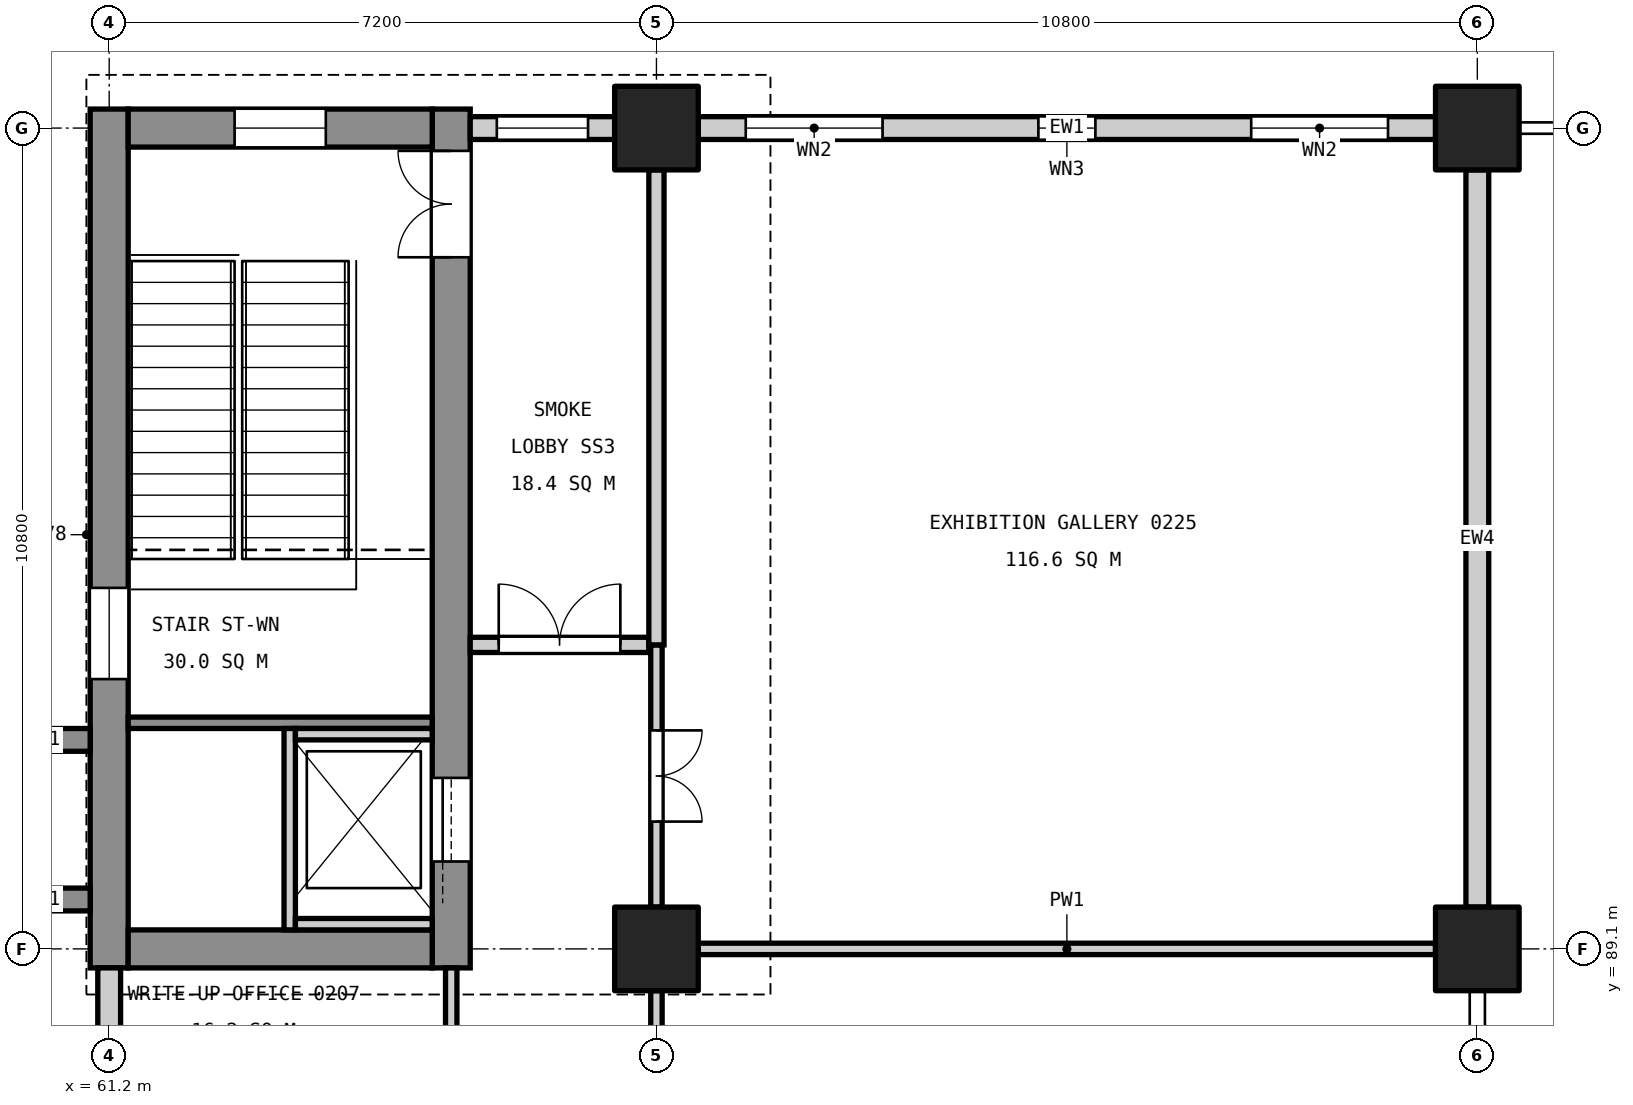
"""IFC4 building model, lengths in metres.
Left out: names, types, materials, properties, quantities, classifications, styles, units other than length and angle.
Written with IfcOpenShell. Run it as: python <this file> out.ifc"""

import sys

from ifc_helpers import new_model, si_unit, direction, frame, frame_2d, origin, origin_2d, place, context, subcontext, project, spatial, rectangle, extrude, element, fill, save


model = new_model("IFC4")
c1 = context("Model", 3, precision=1e-05, world=origin(), true_north=direction((0.0, 1.0)))
c2 = subcontext(c1, "Body", "Model", "MODEL_VIEW")
j1 = project(units=[si_unit("LENGTHUNIT", "METRE"), si_unit("PLANEANGLEUNIT", "RADIAN")], contexts=[c1])
p1 = place(None, origin())
s1 = spatial("IfcSite", under=j1, at=p1, CompositionType="ELEMENT")
p2 = place(p1, origin())
s2 = spatial("IfcBuilding", under=s1, at=p2, CompositionType="ELEMENT")
p3 = place(p2, frame((0.0, 0.0, 11.4)))
s3 = spatial("IfcBuildingStorey", under=s2, at=p3, CompositionType="ELEMENT", Elevation=11.4)
for number, where, z_axis, x_axis in (
    (1, (68.4, 89.1, 0.0), (0.0, 0.0, 1.0), (1.0, 0.0, 0.0)),
    (2, (68.4, 99.9, 0.0), (0.0, 0.0, 1.0), (1.0, 0.0, 0.0)),
    (3, (79.2, 89.1, 0.0), (0.0, 0.0, 1.0), (1.0, 0.0, 0.0)),
    (4, (79.2, 99.9, 0.0), (0.0, 0.0, 1.0), (1.0, 0.0, 0.0)),
):
    element("IfcColumn", number, at=place(p3, frame(where, z_axis=z_axis, x_axis=x_axis)), inside=s3, PredefinedType="COLUMN", context=c2, shape_type="SweptSolid", body=[
        extrude(rectangle(XDim=1.1, YDim=1.1, at=origin_2d()), origin(), (0.0, 0.0, 1.0), 5.4),
    ])
p4 = place(p3, frame((61.2, 88.85, 0.0), z_axis=(0.0, 0.0, 1.0), x_axis=(0.0, 1.0, 0.0)))
e5 = element("IfcWall", 5, at=p4, inside=s3, PredefinedType="SHEAR", context=c2, shape_type="SweptSolid", body=[
    extrude(rectangle(XDim=11.3, YDim=0.5, at=frame_2d((5.65, 0.0))), origin(), (0.0, 0.0, 1.0), 5.1),
])
p5 = place(p4, frame((3.8, 0.0, 3.4)))
e6 = element("IfcOpeningElement", 6, at=p5, cuts=e5, PredefinedType="OPENING", context=c2, shape_type="SweptSolid", body=[
    extrude(rectangle(XDim=1.2, YDim=0.9, at=frame_2d((0.6, 0.45))), frame((0.0, 0.26, 0.0), z_axis=(0.0, -1.0, 0.0), x_axis=(1.0, 0.0, 0.0)), (0.0, 0.0, 1.0), 0.52),
])
p6 = place(p3, frame((65.7, 88.85, 0.0), z_axis=(0.0, 0.0, 1.0), x_axis=(0.0, 1.0, 0.0)))
e7 = element("IfcWall", 7, at=p6, inside=s3, PredefinedType="SHEAR", context=c2, shape_type="SweptSolid", body=[
    extrude(rectangle(XDim=11.3, YDim=0.5, at=frame_2d((5.65, 0.0))), origin(), (0.0, 0.0, 1.0), 5.1),
])
p7 = place(p6, frame((9.35, 0.0, 0.0)))
e8 = element("IfcOpeningElement", 8, at=p7, cuts=e7, PredefinedType="OPENING", context=c2, shape_type="SweptSolid", body=[
    extrude(rectangle(XDim=1.4, YDim=2.1, at=frame_2d((0.7, 1.05))), frame((0.0, 0.26, 0.0), z_axis=(0.0, -1.0, 0.0), x_axis=(1.0, 0.0, 0.0)), (0.0, 0.0, 1.0), 0.52),
])
p8 = place(p6, frame((1.4, 0.0, 0.0)))
e9 = element("IfcOpeningElement", 9, at=p8, cuts=e7, PredefinedType="OPENING", context=c2, shape_type="SweptSolid", body=[
    extrude(rectangle(XDim=1.1, YDim=2.1, at=frame_2d((0.55, 1.05))), frame((0.0, 0.26, 0.0), z_axis=(0.0, -1.0, 0.0), x_axis=(1.0, 0.0, 0.0)), (0.0, 0.0, 1.0), 0.52),
])
p9 = place(p3, frame((61.45, 89.1, 0.0), z_axis=(0.0, 0.0, 1.0), x_axis=(1.0, 0.0, 0.0)))
e10 = element("IfcWall", 10, at=p9, inside=s3, PredefinedType="SHEAR", context=c2, shape_type="SweptSolid", body=[
    extrude(rectangle(XDim=4.0, YDim=0.5, at=frame_2d((2.0, 0.0))), origin(), (0.0, 0.0, 1.0), 5.1),
])
p10 = place(p3, frame((61.45, 99.9, 0.0), z_axis=(0.0, 0.0, 1.0), x_axis=(1.0, 0.0, 0.0)))
e11 = element("IfcWall", 11, at=p10, inside=s3, PredefinedType="SHEAR", context=c2, shape_type="SweptSolid", body=[
    extrude(rectangle(XDim=4.0, YDim=0.5, at=frame_2d((2.0, 0.0))), origin(), (0.0, 0.0, 1.0), 5.1),
])
p11 = place(p10, frame((1.4, 0.0, 3.4)))
e12 = element("IfcOpeningElement", 12, at=p11, cuts=e11, PredefinedType="OPENING", context=c2, shape_type="SweptSolid", body=[
    extrude(rectangle(XDim=1.2, YDim=0.9, at=frame_2d((0.6, 0.45))), frame((0.0, 0.26, 0.0), z_axis=(0.0, -1.0, 0.0), x_axis=(1.0, 0.0, 0.0)), (0.0, 0.0, 1.0), 0.52),
])
for number, where, z_axis, x_axis in (
    (13, (60.95, 89.75, 0.0), (0.0, 0.0, 1.0), (-1.0, 0.0, 0.0)),
    (14, (60.95, 91.85, 0.0), (0.0, 0.0, 1.0), (-1.0, 0.0, 0.0)),
):
    element("IfcWall", number, at=place(p3, frame(where, z_axis=z_axis, x_axis=x_axis)), inside=s3, PredefinedType="SHEAR", context=c2, shape_type="SweptSolid", body=[
        extrude(rectangle(XDim=1.25, YDim=0.3, at=frame_2d((0.625, 0.0))), origin(), (0.0, 0.0, 1.0), 5.4),
    ])
p12 = place(p3, frame((61.45, 92.075, 0.0), z_axis=(0.0, 0.0, 1.0), x_axis=(1.0, 0.0, 0.0)))
e15 = element("IfcWall", 15, at=p12, inside=s3, PredefinedType="SOLIDWALL", context=c2, shape_type="SweptSolid", body=[
    extrude(rectangle(XDim=4.0, YDim=0.15, at=frame_2d((2.0, 0.0))), origin(), (0.0, 0.0, 1.0), 5.1),
])
p13 = place(p3, frame((63.575, 92.0, 0.0), z_axis=(0.0, 0.0, 1.0), x_axis=(0.0, -1.0, 0.0)))
e16 = element("IfcWall", 16, at=p13, inside=s3, PredefinedType="SOLIDWALL", context=c2, shape_type="SweptSolid", body=[
    extrude(rectangle(XDim=2.65, YDim=0.15, at=frame_2d((1.325, 0.0))), origin(), (0.0, 0.0, 1.0), 5.4),
])
for number, where, z_axis, x_axis in (
    (17, (63.65, 91.925, 0.0), (0.0, 0.0, 1.0), (1.0, 0.0, 0.0)),
    (18, (63.65, 89.425, 0.0), (0.0, 0.0, 1.0), (1.0, 0.0, 0.0)),
):
    element("IfcWall", number, at=place(p3, frame(where, z_axis=z_axis, x_axis=x_axis)), inside=s3, PredefinedType="SOLIDWALL", context=c2, shape_type="SweptSolid", body=[
        extrude(rectangle(XDim=1.8, YDim=0.15, at=frame_2d((0.9, 0.0))), origin(), (0.0, 0.0, 1.0), 5.4),
    ])
p14 = place(p3, frame((61.2, 78.85, 0.0), z_axis=(0.0, 0.0, 1.0), x_axis=(0.0, 1.0, 0.0)))
e19 = element("IfcWall", 19, at=p14, inside=s3, PredefinedType="STANDARD", context=c2, shape_type="SweptSolid", body=[
    extrude(rectangle(XDim=10.0, YDim=0.3, at=frame_2d((5.0, 0.0))), origin(), (0.0, 0.0, 1.0), 4.1),
])
p15 = place(p14, frame((0.625, 0.0, 0.9)))
e20 = element("IfcOpeningElement", 20, at=p15, cuts=e19, PredefinedType="OPENING", context=c2, shape_type="SweptSolid", body=[
    extrude(rectangle(XDim=1.8, YDim=3.0, at=frame_2d((0.9, 1.5))), frame((0.0, 0.16, 0.0), z_axis=(0.0, -1.0, 0.0), x_axis=(1.0, 0.0, 0.0)), (0.0, 0.0, 1.0), 0.32),
])
p16 = place(p14, frame((3.95, 0.0, 0.9)))
e21 = element("IfcOpeningElement", 21, at=p16, cuts=e19, PredefinedType="OPENING", context=c2, shape_type="SweptSolid", body=[
    extrude(rectangle(XDim=1.8, YDim=3.0, at=frame_2d((0.9, 1.5))), frame((0.0, 0.16, 0.0), z_axis=(0.0, -1.0, 0.0), x_axis=(1.0, 0.0, 0.0)), (0.0, 0.0, 1.0), 0.32),
])
p17 = place(p14, frame((7.95, 0.0, 0.8)))
e22 = element("IfcOpeningElement", 22, at=p17, cuts=e19, PredefinedType="OPENING", context=c2, shape_type="SweptSolid", body=[
    extrude(rectangle(XDim=0.75, YDim=1.2, at=frame_2d((0.375, 0.6))), frame((0.0, 0.16, 0.0), z_axis=(0.0, -1.0, 0.0), x_axis=(1.0, 0.0, 0.0)), (0.0, 0.0, 1.0), 0.32),
])
p18 = place(p3, frame((65.95, 99.9, 0.0), z_axis=(0.0, 0.0, 1.0), x_axis=(1.0, 0.0, 0.0)))
e23 = element("IfcWall", 23, at=p18, inside=s3, PredefinedType="STANDARD", context=c2, shape_type="SweptSolid", body=[
    extrude(rectangle(XDim=1.9, YDim=0.3, at=frame_2d((0.95, 0.0))), origin(), (0.0, 0.0, 1.0), 4.3),
])
p19 = place(p18, frame((0.35, 0.0, 0.9)))
e24 = element("IfcOpeningElement", 24, at=p19, cuts=e23, PredefinedType="OPENING", context=c2, shape_type="SweptSolid", body=[
    extrude(rectangle(XDim=1.2, YDim=2.4, at=frame_2d((0.6, 1.2))), frame((0.0, 0.16, 0.0), z_axis=(0.0, -1.0, 0.0), x_axis=(1.0, 0.0, 0.0)), (0.0, 0.0, 1.0), 0.32),
])
p20 = place(p3, frame((68.95, 99.9, 0.0), z_axis=(0.0, 0.0, 1.0), x_axis=(1.0, 0.0, 0.0)))
e25 = element("IfcWall", 25, at=p20, inside=s3, PredefinedType="STANDARD", context=c2, shape_type="SweptSolid", body=[
    extrude(rectangle(XDim=9.7, YDim=0.3, at=frame_2d((4.85, 0.0))), origin(), (0.0, 0.0, 1.0), 4.3),
])
p21 = place(p20, frame((0.625, 0.0, 0.9)))
e26 = element("IfcOpeningElement", 26, at=p21, cuts=e25, PredefinedType="OPENING", context=c2, shape_type="SweptSolid", body=[
    extrude(rectangle(XDim=1.8, YDim=3.0, at=frame_2d((0.9, 1.5))), frame((0.0, 0.16, 0.0), z_axis=(0.0, -1.0, 0.0), x_axis=(1.0, 0.0, 0.0)), (0.0, 0.0, 1.0), 0.32),
])
p22 = place(p20, frame((4.475, 0.0, 0.8)))
e27 = element("IfcOpeningElement", 27, at=p22, cuts=e25, PredefinedType="OPENING", context=c2, shape_type="SweptSolid", body=[
    extrude(rectangle(XDim=0.75, YDim=1.2, at=frame_2d((0.375, 0.6))), frame((0.0, 0.16, 0.0), z_axis=(0.0, -1.0, 0.0), x_axis=(1.0, 0.0, 0.0)), (0.0, 0.0, 1.0), 0.32),
])
p23 = place(p20, frame((7.275, 0.0, 0.9)))
e28 = element("IfcOpeningElement", 28, at=p23, cuts=e25, PredefinedType="OPENING", context=c2, shape_type="SweptSolid", body=[
    extrude(rectangle(XDim=1.8, YDim=3.0, at=frame_2d((0.9, 1.5))), frame((0.0, 0.16, 0.0), z_axis=(0.0, -1.0, 0.0), x_axis=(1.0, 0.0, 0.0)), (0.0, 0.0, 1.0), 0.32),
])
p24 = place(p3, frame((79.2, 89.65, 0.0), z_axis=(0.0, 0.0, 1.0), x_axis=(0.0, 1.0, 0.0)))
e29 = element("IfcWall", 29, at=p24, inside=s3, PredefinedType="STANDARD", context=c2, shape_type="SweptSolid", body=[
    extrude(rectangle(XDim=9.7, YDim=0.3, at=frame_2d((4.85, 0.0))), origin(), (0.0, 0.0, 1.0), 4.0),
])
p25 = place(p3, frame((65.7, 78.45, 0.0), z_axis=(0.0, 0.0, 1.0), x_axis=(0.0, 1.0, 0.0)))
e30 = element("IfcWall", 30, at=p25, inside=s3, PredefinedType="PARTITIONING", context=c2, shape_type="SweptSolid", body=[
    extrude(rectangle(XDim=10.4, YDim=0.15, at=frame_2d((5.2, 0.0))), origin(), (0.0, 0.0, 1.0), 4.0),
])
p26 = place(p25, frame((2.95, 0.0, 0.0)))
e31 = element("IfcOpeningElement", 31, at=p26, cuts=e30, PredefinedType="OPENING", context=c2, shape_type="SweptSolid", body=[
    extrude(rectangle(XDim=1.0, YDim=2.1, at=frame_2d((0.5, 1.05))), frame((0.0, 0.085, 0.0), z_axis=(0.0, -1.0, 0.0), x_axis=(1.0, 0.0, 0.0)), (0.0, 0.0, 1.0), 0.17),
])
p27 = place(p25, frame((8.35, 0.0, 0.0)))
e32 = element("IfcOpeningElement", 32, at=p27, cuts=e30, PredefinedType="OPENING", context=c2, shape_type="SweptSolid", body=[
    extrude(rectangle(XDim=1.0, YDim=2.1, at=frame_2d((0.5, 1.05))), frame((0.0, 0.085, 0.0), z_axis=(0.0, -1.0, 0.0), x_axis=(1.0, 0.0, 0.0)), (0.0, 0.0, 1.0), 0.17),
])
p28 = place(p3, frame((65.95, 93.1, 0.0), z_axis=(0.0, 0.0, 1.0), x_axis=(1.0, 0.0, 0.0)))
e33 = element("IfcWall", 33, at=p28, inside=s3, PredefinedType="PARTITIONING", context=c2, shape_type="SweptSolid", body=[
    extrude(rectangle(XDim=2.35, YDim=0.2, at=frame_2d((1.175, 0.0))), origin(), (0.0, 0.0, 1.0), 4.0),
])
p29 = place(p28, frame((0.375, 0.0, 0.0)))
e34 = element("IfcOpeningElement", 34, at=p29, cuts=e33, PredefinedType="OPENING", context=c2, shape_type="SweptSolid", body=[
    extrude(rectangle(XDim=1.6, YDim=2.1, at=frame_2d((0.8, 1.05))), frame((0.0, 0.11, 0.0), z_axis=(0.0, -1.0, 0.0), x_axis=(1.0, 0.0, 0.0)), (0.0, 0.0, 1.0), 0.22),
])
p30 = place(p3, frame((68.4, 78.85, 0.0), z_axis=(0.0, 0.0, 1.0), x_axis=(0.0, 1.0, 0.0)))
e35 = element("IfcWall", 35, at=p30, inside=s3, PredefinedType="PARTITIONING", context=c2, shape_type="SweptSolid", body=[
    extrude(rectangle(XDim=9.7, YDim=0.15, at=frame_2d((4.85, 0.0))), origin(), (0.0, 0.0, 1.0), 4.0),
])
p31 = place(p30, frame((2.825, 0.0, 0.0)))
e36 = element("IfcOpeningElement", 36, at=p31, cuts=e35, PredefinedType="OPENING", context=c2, shape_type="SweptSolid", body=[
    extrude(rectangle(XDim=1.2, YDim=2.1, at=frame_2d((0.6, 1.05))), frame((0.0, 0.085, 0.0), z_axis=(0.0, -1.0, 0.0), x_axis=(1.0, 0.0, 0.0)), (0.0, 0.0, 1.0), 0.17),
])
p32 = place(p30, frame((7.575, 0.0, 0.0)))
e37 = element("IfcOpeningElement", 37, at=p32, cuts=e35, PredefinedType="OPENING", context=c2, shape_type="SweptSolid", body=[
    extrude(rectangle(XDim=1.2, YDim=2.1, at=frame_2d((0.6, 1.05))), frame((0.0, 0.085, 0.0), z_axis=(0.0, -1.0, 0.0), x_axis=(1.0, 0.0, 0.0)), (0.0, 0.0, 1.0), 0.17),
])
p33 = place(p3, frame((68.4, 89.65, 0.0), z_axis=(0.0, 0.0, 1.0), x_axis=(0.0, 1.0, 0.0)))
e38 = element("IfcWall", 38, at=p33, inside=s3, PredefinedType="PARTITIONING", context=c2, shape_type="SweptSolid", body=[
    extrude(rectangle(XDim=3.45, YDim=0.15, at=frame_2d((1.725, 0.0))), origin(), (0.0, 0.0, 1.0), 4.0),
])
p34 = place(p33, frame((1.125, 0.0, 0.0)))
e39 = element("IfcOpeningElement", 39, at=p34, cuts=e38, PredefinedType="OPENING", context=c2, shape_type="SweptSolid", body=[
    extrude(rectangle(XDim=1.2, YDim=2.1, at=frame_2d((0.6, 1.05))), frame((0.0, 0.085, 0.0), z_axis=(0.0, -1.0, 0.0), x_axis=(1.0, 0.0, 0.0)), (0.0, 0.0, 1.0), 0.17),
])
p35 = place(p3, frame((68.4, 93.1, 0.0), z_axis=(0.0, 0.0, 1.0), x_axis=(0.0, 1.0, 0.0)))
e40 = element("IfcWall", 40, at=p35, inside=s3, PredefinedType="PARTITIONING", context=c2, shape_type="SweptSolid", body=[
    extrude(rectangle(XDim=6.25, YDim=0.2, at=frame_2d((3.125, 0.0))), origin(), (0.0, 0.0, 1.0), 4.0),
])
p36 = place(p3, frame((68.95, 89.1, 0.0), z_axis=(0.0, 0.0, 1.0), x_axis=(1.0, 0.0, 0.0)))
e41 = element("IfcWall", 41, at=p36, inside=s3, PredefinedType="PARTITIONING", context=c2, shape_type="SweptSolid", body=[
    extrude(rectangle(XDim=9.7, YDim=0.15, at=frame_2d((4.85, 0.0))), origin(), (0.0, 0.0, 1.0), 4.3),
])
p37 = place(p7, origin())
e42 = element("IfcDoor", 42, at=p37, inside=s3, OperationType="DOUBLE_DOOR_SINGLE_SWING", PredefinedType="DOOR", context=c2, shape_type="SweptSolid", body=[
    extrude(rectangle(XDim=1.4, YDim=2.1, at=frame_2d((0.7, 1.05))), frame((0.0, 0.025, 0.0), z_axis=(0.0, -1.0, 0.0), x_axis=(1.0, 0.0, 0.0)), (0.0, 0.0, 1.0), 0.05),
])
fill(e8, e42)
p38 = place(p8, origin())
e43 = element("IfcDoor", 43, at=p38, inside=s3, OperationType="SLIDING_TO_LEFT", PredefinedType="DOOR", context=c2, shape_type="SweptSolid", body=[
    extrude(rectangle(XDim=1.1, YDim=2.1, at=frame_2d((0.55, 1.05))), frame((0.0, 0.025, 0.0), z_axis=(0.0, -1.0, 0.0), x_axis=(1.0, 0.0, 0.0)), (0.0, 0.0, 1.0), 0.05),
])
fill(e9, e43)
p39 = place(p19, origin())
e44 = element("IfcWindow", 44, at=p39, inside=s3, PartitioningType="SINGLE_PANEL", PredefinedType="WINDOW", context=c2, shape_type="SweptSolid", body=[
    extrude(rectangle(XDim=1.2, YDim=2.4, at=frame_2d((0.6, 1.2))), frame((0.0, 0.03, 0.0), z_axis=(0.0, -1.0, 0.0), x_axis=(1.0, 0.0, 0.0)), (0.0, 0.0, 1.0), 0.06),
])
fill(e24, e44)
p40 = place(p21, origin())
e45 = element("IfcWindow", 45, at=p40, inside=s3, PartitioningType="SINGLE_PANEL", PredefinedType="WINDOW", context=c2, shape_type="SweptSolid", body=[
    extrude(rectangle(XDim=1.8, YDim=3.0, at=frame_2d((0.9, 1.5))), frame((0.0, 0.03, 0.0), z_axis=(0.0, -1.0, 0.0), x_axis=(1.0, 0.0, 0.0)), (0.0, 0.0, 1.0), 0.06),
])
fill(e26, e45)
p41 = place(p22, origin())
e46 = element("IfcWindow", 46, at=p41, inside=s3, PartitioningType="SINGLE_PANEL", PredefinedType="WINDOW", context=c2, shape_type="SweptSolid", body=[
    extrude(rectangle(XDim=0.75, YDim=1.2, at=frame_2d((0.375, 0.6))), frame((0.0, 0.03, 0.0), z_axis=(0.0, -1.0, 0.0), x_axis=(1.0, 0.0, 0.0)), (0.0, 0.0, 1.0), 0.06),
])
fill(e27, e46)
p42 = place(p23, origin())
e47 = element("IfcWindow", 47, at=p42, inside=s3, PartitioningType="SINGLE_PANEL", PredefinedType="WINDOW", context=c2, shape_type="SweptSolid", body=[
    extrude(rectangle(XDim=1.8, YDim=3.0, at=frame_2d((0.9, 1.5))), frame((0.0, 0.03, 0.0), z_axis=(0.0, -1.0, 0.0), x_axis=(1.0, 0.0, 0.0)), (0.0, 0.0, 1.0), 0.06),
])
fill(e28, e47)
p43 = place(p5, origin())
e48 = element("IfcWindow", 48, at=p43, inside=s3, PartitioningType="SINGLE_PANEL", PredefinedType="WINDOW", context=c2, shape_type="SweptSolid", body=[
    extrude(rectangle(XDim=1.2, YDim=0.9, at=frame_2d((0.6, 0.45))), frame((0.0, 0.03, 0.0), z_axis=(0.0, -1.0, 0.0), x_axis=(1.0, 0.0, 0.0)), (0.0, 0.0, 1.0), 0.06),
])
fill(e6, e48)
p44 = place(p11, origin())
e49 = element("IfcWindow", 49, at=p44, inside=s3, PartitioningType="SINGLE_PANEL", PredefinedType="WINDOW", context=c2, shape_type="SweptSolid", body=[
    extrude(rectangle(XDim=1.2, YDim=0.9, at=frame_2d((0.6, 0.45))), frame((0.0, 0.03, 0.0), z_axis=(0.0, -1.0, 0.0), x_axis=(1.0, 0.0, 0.0)), (0.0, 0.0, 1.0), 0.06),
])
fill(e12, e49)
p45 = place(p34, frame((1.2, 0.0, 0.0), z_axis=(0.0, 0.0, 1.0), x_axis=(-1.0, 0.0, 0.0)))
e50 = element("IfcDoor", 50, at=p45, inside=s3, OperationType="DOUBLE_DOOR_SINGLE_SWING", PredefinedType="DOOR", context=c2, shape_type="SweptSolid", body=[
    extrude(rectangle(XDim=1.2, YDim=2.1, at=frame_2d((0.6, 1.05))), frame((0.0, 0.025, 0.0), z_axis=(0.0, -1.0, 0.0), x_axis=(1.0, 0.0, 0.0)), (0.0, 0.0, 1.0), 0.05),
])
fill(e39, e50)
p46 = place(p29, origin())
e51 = element("IfcDoor", 51, at=p46, inside=s3, OperationType="DOUBLE_DOOR_SINGLE_SWING", PredefinedType="DOOR", context=c2, shape_type="SweptSolid", body=[
    extrude(rectangle(XDim=1.6, YDim=2.1, at=frame_2d((0.8, 1.05))), frame((0.0, 0.025, 0.0), z_axis=(0.0, -1.0, 0.0), x_axis=(1.0, 0.0, 0.0)), (0.0, 0.0, 1.0), 0.05),
])
fill(e34, e51)
save(model, sys.argv[1])
